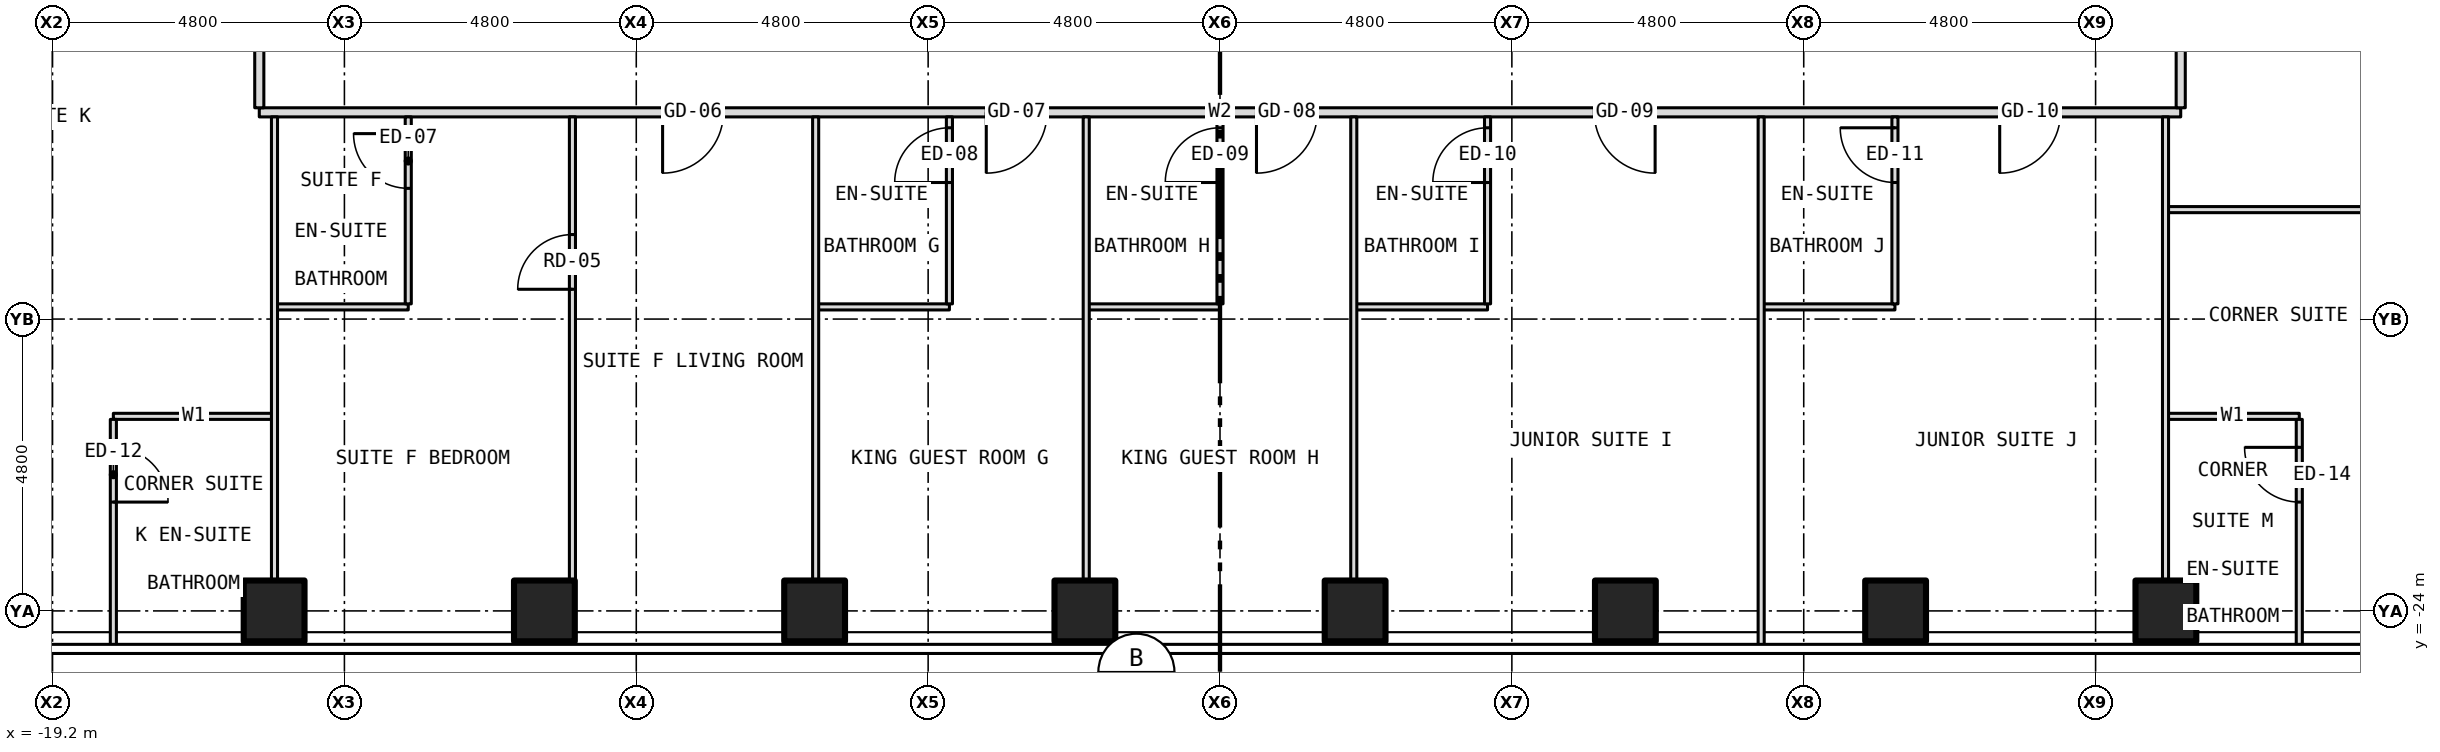
"""IFC4 building model, lengths in metres.
Left out: names, types, materials, properties, quantities, classifications, styles, units other than length and angle.
Written with IfcOpenShell. Run it as: python <this file> out.ifc"""

import sys

from ifc_helpers import new_model, si_unit, direction, frame, frame_2d, origin, origin_2d, place, context, subcontext, project, spatial, rectangle, hollow_rectangle, extrude, element, fill, save


model = new_model("IFC4")
c1 = context("Model", 3, precision=1e-05, world=origin(), true_north=direction((0.0, 1.0)))
c2 = subcontext(c1, "Body", "Model", "MODEL_VIEW")
j1 = project(units=[si_unit("LENGTHUNIT", "METRE"), si_unit("PLANEANGLEUNIT", "RADIAN")], contexts=[c1])
p1 = place(None, origin())
s1 = spatial("IfcSite", under=j1, at=p1, CompositionType="ELEMENT")
p2 = place(p1, origin())
s2 = spatial("IfcBuilding", under=s1, at=p2, CompositionType="ELEMENT")
p3 = place(p2, frame((0.0, 0.0, 39.0)))
s3 = spatial("IfcBuildingStorey", under=s2, at=p3, CompositionType="ELEMENT", Elevation=39.0)
for number, where, z_axis, x_axis in (
    (1, (-15.556, -24.0, -0.15), (0.0, 0.0, 1.0), (1.0, 0.0, 0.0)),
    (2, (-11.111, -24.0, -0.15), (0.0, 0.0, 1.0), (1.0, 0.0, 0.0)),
    (3, (-6.667, -24.0, -0.15), (0.0, 0.0, 1.0), (1.0, 0.0, 0.0)),
    (4, (-2.222, -24.0, -0.15), (0.0, 0.0, 1.0), (1.0, 0.0, 0.0)),
    (5, (2.222, -24.0, -0.15), (0.0, 0.0, 1.0), (1.0, 0.0, 0.0)),
    (6, (6.667, -24.0, -0.15), (0.0, 0.0, 1.0), (1.0, 0.0, 0.0)),
    (7, (11.111, -24.0, -0.15), (0.0, 0.0, 1.0), (1.0, 0.0, 0.0)),
    (8, (15.556, -24.0, -0.15), (0.0, 0.0, 1.0), (1.0, 0.0, 0.0)),
):
    element("IfcColumn", number, at=place(p3, frame(where, z_axis=z_axis, x_axis=x_axis)), inside=s3, PredefinedType="COLUMN", context=c2, shape_type="SweptSolid", body=[
        extrude(hollow_rectangle(XDim=1.0, YDim=1.0, WallThickness=0.06, at=origin_2d()), origin(), (0.0, 0.0, 1.0), 3.5),
    ])
p4 = place(p3, frame((-18.2, -20.8, 0.0), z_axis=(0.0, 0.0, 1.0), x_axis=(1.0, 0.0, 0.0)))
e9 = element("IfcWall", 9, at=p4, inside=s3, PredefinedType="PARTITIONING", context=c2, shape_type="SweptSolid", body=[
    extrude(rectangle(XDim=2.65, YDim=0.1, at=frame_2d((1.325, 0.0))), origin(), (0.0, 0.0, 1.0), 3.35),
])
for number, where, z_axis, x_axis in (
    (10, (15.55, -20.8, 0.0), (0.0, 0.0, 1.0), (1.0, 0.0, 0.0)),
    (11, (-15.55, -19.0, 0.0), (0.0, 0.0, 1.0), (1.0, 0.0, 0.0)),
    (12, (-6.65, -19.0, 0.0), (0.0, 0.0, 1.0), (1.0, 0.0, 0.0)),
    (13, (-2.2, -19.0, 0.0), (0.0, 0.0, 1.0), (1.0, 0.0, 0.0)),
    (14, (2.2, -19.0, 0.0), (0.0, 0.0, 1.0), (1.0, 0.0, 0.0)),
):
    element("IfcWall", number, at=place(p3, frame(where, z_axis=z_axis, x_axis=x_axis)), inside=s3, PredefinedType="PARTITIONING", context=c2, shape_type="SweptSolid", body=[
        extrude(rectangle(XDim=2.2, YDim=0.1, at=frame_2d((1.1, 0.0))), origin(), (0.0, 0.0, 1.0), 3.35),
    ])
p5 = place(p3, frame((8.9, -19.0, 0.0), z_axis=(0.0, 0.0, 1.0), x_axis=(1.0, 0.0, 0.0)))
e15 = element("IfcWall", 15, at=p5, inside=s3, PredefinedType="PARTITIONING", context=c2, shape_type="SweptSolid", body=[
    extrude(rectangle(XDim=2.2, YDim=0.1, at=frame_2d((1.1, 0.0))), origin(), (0.0, 0.0, 1.0), 3.35),
])
p6 = place(p3, frame((15.55, -17.4, 0.0), z_axis=(0.0, 0.0, 1.0), x_axis=(1.0, 0.0, 0.0)))
e16 = element("IfcWall", 16, at=p6, inside=s3, PredefinedType="PARTITIONING", context=c2, shape_type="SweptSolid", body=[
    extrude(rectangle(XDim=9.03, YDim=0.1, at=frame_2d((4.515, 0.0))), origin(), (0.0, 0.0, 1.0), 3.35),
])
p7 = place(p6, frame((3.778, 0.0, 0.0)))
e17 = element("IfcOpeningElement", 17, at=p7, cuts=e16, PredefinedType="OPENING", context=c2, shape_type="SweptSolid", body=[
    extrude(rectangle(XDim=0.9, YDim=2.1, at=frame_2d((0.45, 1.05))), frame((0.0, 0.062, 0.0), z_axis=(0.0, -1.0, 0.0), x_axis=(1.0, 0.0, 0.0)), (0.0, 0.0, 1.0), 0.124),
])
p8 = place(p3, frame((-15.8, -15.8, 0.0), z_axis=(0.0, 0.0, 1.0), x_axis=(1.0, 0.0, 0.0)))
e18 = element("IfcWall", 18, at=p8, inside=s3, PredefinedType="PARTITIONING", context=c2, shape_type="SweptSolid", body=[
    extrude(rectangle(XDim=31.6, YDim=0.15, at=frame_2d((15.8, 0.0))), origin(), (0.0, 0.0, 1.0), 3.35),
])
p9 = place(p8, frame((6.633, 0.0, 0.0)))
e19 = element("IfcOpeningElement", 19, at=p9, cuts=e18, PredefinedType="OPENING", context=c2, shape_type="SweptSolid", body=[
    extrude(rectangle(XDim=1.0, YDim=2.1, at=frame_2d((0.5, 1.05))), frame((0.0, 0.087, 0.0), z_axis=(0.0, -1.0, 0.0), x_axis=(1.0, 0.0, 0.0)), (0.0, 0.0, 1.0), 0.174),
])
p10 = place(p8, frame((11.956, 0.0, 0.0)))
e20 = element("IfcOpeningElement", 20, at=p10, cuts=e18, PredefinedType="OPENING", context=c2, shape_type="SweptSolid", body=[
    extrude(rectangle(XDim=1.0, YDim=2.1, at=frame_2d((0.5, 1.05))), frame((0.0, 0.087, 0.0), z_axis=(0.0, -1.0, 0.0), x_axis=(1.0, 0.0, 0.0)), (0.0, 0.0, 1.0), 0.174),
])
p11 = place(p8, frame((16.4, 0.0, 0.0)))
e21 = element("IfcOpeningElement", 21, at=p11, cuts=e18, PredefinedType="OPENING", context=c2, shape_type="SweptSolid", body=[
    extrude(rectangle(XDim=1.0, YDim=2.1, at=frame_2d((0.5, 1.05))), frame((0.0, 0.087, 0.0), z_axis=(0.0, -1.0, 0.0), x_axis=(1.0, 0.0, 0.0)), (0.0, 0.0, 1.0), 0.174),
])
p12 = place(p8, frame((21.956, 0.0, 0.0)))
e22 = element("IfcOpeningElement", 22, at=p12, cuts=e18, PredefinedType="OPENING", context=c2, shape_type="SweptSolid", body=[
    extrude(rectangle(XDim=1.0, YDim=2.1, at=frame_2d((0.5, 1.05))), frame((0.0, 0.087, 0.0), z_axis=(0.0, -1.0, 0.0), x_axis=(1.0, 0.0, 0.0)), (0.0, 0.0, 1.0), 0.174),
])
p13 = place(p8, frame((28.623, 0.0, 0.0)))
e23 = element("IfcOpeningElement", 23, at=p13, cuts=e18, PredefinedType="OPENING", context=c2, shape_type="SweptSolid", body=[
    extrude(rectangle(XDim=1.0, YDim=2.1, at=frame_2d((0.5, 1.05))), frame((0.0, 0.087, 0.0), z_axis=(0.0, -1.0, 0.0), x_axis=(1.0, 0.0, 0.0)), (0.0, 0.0, 1.0), 0.174),
])
p14 = place(p3, frame((-18.2, -24.58, 0.0), z_axis=(0.0, 0.0, 1.0), x_axis=(0.0, 1.0, 0.0)))
e24 = element("IfcWall", 24, at=p14, inside=s3, PredefinedType="PARTITIONING", context=c2, shape_type="SweptSolid", body=[
    extrude(rectangle(XDim=3.73, YDim=0.1, at=frame_2d((1.865, 0.0))), origin(), (0.0, 0.0, 1.0), 3.35),
])
p15 = place(p14, frame((2.37, 0.0, 0.0)))
e25 = element("IfcOpeningElement", 25, at=p15, cuts=e24, PredefinedType="OPENING", context=c2, shape_type="SweptSolid", body=[
    extrude(rectangle(XDim=0.9, YDim=2.1, at=frame_2d((0.45, 1.05))), frame((0.0, 0.062, 0.0), z_axis=(0.0, -1.0, 0.0), x_axis=(1.0, 0.0, 0.0)), (0.0, 0.0, 1.0), 0.124),
])
p16 = place(p3, frame((-15.8, -15.725, 0.0), z_axis=(0.0, 0.0, 1.0), x_axis=(0.0, 1.0, 0.0)))
e26 = element("IfcWall", 26, at=p16, inside=s3, PredefinedType="PARTITIONING", context=c2, shape_type="SweptSolid", body=[
    extrude(rectangle(XDim=4.805, YDim=0.15, at=frame_2d((2.403, 0.0))), origin(), (0.0, 0.0, 1.0), 3.35),
])
p17 = place(p16, frame((3.025, 0.0, 0.0)))
e27 = element("IfcOpeningElement", 27, at=p17, cuts=e26, PredefinedType="OPENING", context=c2, shape_type="SweptSolid", body=[
    extrude(rectangle(XDim=1.0, YDim=2.1, at=frame_2d((0.5, 1.05))), frame((0.0, 0.087, 0.0), z_axis=(0.0, -1.0, 0.0), x_axis=(1.0, 0.0, 0.0)), (0.0, 0.0, 1.0), 0.174),
])
p18 = place(p3, frame((-15.55, -23.88, 0.0), z_axis=(0.0, 0.0, 1.0), x_axis=(0.0, 1.0, 0.0)))
e28 = element("IfcWall", 28, at=p18, inside=s3, PredefinedType="PARTITIONING", context=c2, shape_type="SweptSolid", body=[
    extrude(rectangle(XDim=8.005, YDim=0.1, at=frame_2d((4.002, 0.0))), origin(), (0.0, 0.0, 1.0), 3.35),
])
p19 = place(p3, frame((-13.35, -18.95, 0.0), z_axis=(0.0, 0.0, 1.0), x_axis=(0.0, 1.0, 0.0)))
e29 = element("IfcWall", 29, at=p19, inside=s3, PredefinedType="PARTITIONING", context=c2, shape_type="SweptSolid", body=[
    extrude(rectangle(XDim=3.075, YDim=0.1, at=frame_2d((1.538, 0.0))), origin(), (0.0, 0.0, 1.0), 3.35),
])
p20 = place(p19, frame((1.9, 0.0, 0.0)))
e30 = element("IfcOpeningElement", 30, at=p20, cuts=e29, PredefinedType="OPENING", context=c2, shape_type="SweptSolid", body=[
    extrude(rectangle(XDim=0.9, YDim=2.1, at=frame_2d((0.45, 1.05))), frame((0.0, 0.062, 0.0), z_axis=(0.0, -1.0, 0.0), x_axis=(1.0, 0.0, 0.0)), (0.0, 0.0, 1.0), 0.124),
])
p21 = place(p3, frame((-10.65, -23.88, 0.0), z_axis=(0.0, 0.0, 1.0), x_axis=(0.0, 1.0, 0.0)))
e31 = element("IfcWall", 31, at=p21, inside=s3, PredefinedType="PARTITIONING", context=c2, shape_type="SweptSolid", body=[
    extrude(rectangle(XDim=8.005, YDim=0.1, at=frame_2d((4.002, 0.0))), origin(), (0.0, 0.0, 1.0), 3.35),
])
p22 = place(p21, frame((5.17, 0.0, 0.0)))
e32 = element("IfcOpeningElement", 32, at=p22, cuts=e31, PredefinedType="OPENING", context=c2, shape_type="SweptSolid", body=[
    extrude(rectangle(XDim=0.9, YDim=2.1, at=frame_2d((0.45, 1.05))), frame((0.0, 0.062, 0.0), z_axis=(0.0, -1.0, 0.0), x_axis=(1.0, 0.0, 0.0)), (0.0, 0.0, 1.0), 0.124),
])
p23 = place(p3, frame((-6.65, -23.88, 0.0), z_axis=(0.0, 0.0, 1.0), x_axis=(0.0, 1.0, 0.0)))
e33 = element("IfcWall", 33, at=p23, inside=s3, PredefinedType="PARTITIONING", context=c2, shape_type="SweptSolid", body=[
    extrude(rectangle(XDim=8.005, YDim=0.1, at=frame_2d((4.002, 0.0))), origin(), (0.0, 0.0, 1.0), 3.35),
])
p24 = place(p3, frame((-4.45, -18.95, 0.0), z_axis=(0.0, 0.0, 1.0), x_axis=(0.0, 1.0, 0.0)))
e34 = element("IfcWall", 34, at=p24, inside=s3, PredefinedType="PARTITIONING", context=c2, shape_type="SweptSolid", body=[
    extrude(rectangle(XDim=3.075, YDim=0.1, at=frame_2d((1.538, 0.0))), origin(), (0.0, 0.0, 1.0), 3.35),
])
p25 = place(p24, frame((1.996, 0.0, 0.0)))
e35 = element("IfcOpeningElement", 35, at=p25, cuts=e34, PredefinedType="OPENING", context=c2, shape_type="SweptSolid", body=[
    extrude(rectangle(XDim=0.9, YDim=2.1, at=frame_2d((0.45, 1.05))), frame((0.0, 0.062, 0.0), z_axis=(0.0, -1.0, 0.0), x_axis=(1.0, 0.0, 0.0)), (0.0, 0.0, 1.0), 0.124),
])
p26 = place(p3, frame((-2.2, -23.88, 0.0), z_axis=(0.0, 0.0, 1.0), x_axis=(0.0, 1.0, 0.0)))
e36 = element("IfcWall", 36, at=p26, inside=s3, PredefinedType="PARTITIONING", context=c2, shape_type="SweptSolid", body=[
    extrude(rectangle(XDim=8.005, YDim=0.1, at=frame_2d((4.002, 0.0))), origin(), (0.0, 0.0, 1.0), 3.35),
])
p27 = place(p3, frame((0.0, -18.95, 0.0), z_axis=(0.0, 0.0, 1.0), x_axis=(0.0, 1.0, 0.0)))
e37 = element("IfcWall", 37, at=p27, inside=s3, PredefinedType="PARTITIONING", context=c2, shape_type="SweptSolid", body=[
    extrude(rectangle(XDim=3.075, YDim=0.1, at=frame_2d((1.538, 0.0))), origin(), (0.0, 0.0, 1.0), 2.728),
])
p28 = place(p27, frame((1.996, 0.0, 0.0)))
e38 = element("IfcOpeningElement", 38, at=p28, cuts=e37, PredefinedType="OPENING", context=c2, shape_type="SweptSolid", body=[
    extrude(rectangle(XDim=0.9, YDim=2.1, at=frame_2d((0.45, 1.05))), frame((0.0, 0.062, 0.0), z_axis=(0.0, -1.0, 0.0), x_axis=(1.0, 0.0, 0.0)), (0.0, 0.0, 1.0), 0.124),
])
p29 = place(p3, frame((2.2, -23.88, 0.0), z_axis=(0.0, 0.0, 1.0), x_axis=(0.0, 1.0, 0.0)))
e39 = element("IfcWall", 39, at=p29, inside=s3, PredefinedType="PARTITIONING", context=c2, shape_type="SweptSolid", body=[
    extrude(rectangle(XDim=8.005, YDim=0.1, at=frame_2d((4.002, 0.0))), origin(), (0.0, 0.0, 1.0), 3.35),
])
p30 = place(p3, frame((4.4, -18.95, 0.0), z_axis=(0.0, 0.0, 1.0), x_axis=(0.0, 1.0, 0.0)))
e40 = element("IfcWall", 40, at=p30, inside=s3, PredefinedType="PARTITIONING", context=c2, shape_type="SweptSolid", body=[
    extrude(rectangle(XDim=3.075, YDim=0.1, at=frame_2d((1.538, 0.0))), origin(), (0.0, 0.0, 1.0), 3.35),
])
p31 = place(p30, frame((1.996, 0.0, 0.0)))
e41 = element("IfcOpeningElement", 41, at=p31, cuts=e40, PredefinedType="OPENING", context=c2, shape_type="SweptSolid", body=[
    extrude(rectangle(XDim=0.9, YDim=2.1, at=frame_2d((0.45, 1.05))), frame((0.0, 0.062, 0.0), z_axis=(0.0, -1.0, 0.0), x_axis=(1.0, 0.0, 0.0)), (0.0, 0.0, 1.0), 0.124),
])
p32 = place(p3, frame((8.9, -24.58, 0.0), z_axis=(0.0, 0.0, 1.0), x_axis=(0.0, 1.0, 0.0)))
e42 = element("IfcWall", 42, at=p32, inside=s3, PredefinedType="PARTITIONING", context=c2, shape_type="SweptSolid", body=[
    extrude(rectangle(XDim=8.705, YDim=0.1, at=frame_2d((4.353, 0.0))), origin(), (0.0, 0.0, 1.0), 3.35),
])
p33 = place(p3, frame((11.1, -18.95, 0.0), z_axis=(0.0, 0.0, 1.0), x_axis=(0.0, 1.0, 0.0)))
e43 = element("IfcWall", 43, at=p33, inside=s3, PredefinedType="PARTITIONING", context=c2, shape_type="SweptSolid", body=[
    extrude(rectangle(XDim=3.075, YDim=0.1, at=frame_2d((1.538, 0.0))), origin(), (0.0, 0.0, 1.0), 3.35),
])
p34 = place(p33, frame((1.996, 0.0, 0.0)))
e44 = element("IfcOpeningElement", 44, at=p34, cuts=e43, PredefinedType="OPENING", context=c2, shape_type="SweptSolid", body=[
    extrude(rectangle(XDim=0.9, YDim=2.1, at=frame_2d((0.45, 1.05))), frame((0.0, 0.062, 0.0), z_axis=(0.0, -1.0, 0.0), x_axis=(1.0, 0.0, 0.0)), (0.0, 0.0, 1.0), 0.124),
])
p35 = place(p3, frame((15.55, -23.88, 0.0), z_axis=(0.0, 0.0, 1.0), x_axis=(0.0, 1.0, 0.0)))
e45 = element("IfcWall", 45, at=p35, inside=s3, PredefinedType="PARTITIONING", context=c2, shape_type="SweptSolid", body=[
    extrude(rectangle(XDim=8.005, YDim=0.1, at=frame_2d((4.002, 0.0))), origin(), (0.0, 0.0, 1.0), 3.35),
])
p36 = place(p3, frame((15.8, -15.725, 0.0), z_axis=(0.0, 0.0, 1.0), x_axis=(0.0, 1.0, 0.0)))
e46 = element("IfcWall", 46, at=p36, inside=s3, PredefinedType="PARTITIONING", context=c2, shape_type="SweptSolid", body=[
    extrude(rectangle(XDim=4.805, YDim=0.15, at=frame_2d((2.403, 0.0))), origin(), (0.0, 0.0, 1.0), 3.35),
])
p37 = place(p36, frame((3.025, 0.0, 0.0)))
e47 = element("IfcOpeningElement", 47, at=p37, cuts=e46, PredefinedType="OPENING", context=c2, shape_type="SweptSolid", body=[
    extrude(rectangle(XDim=1.0, YDim=2.1, at=frame_2d((0.5, 1.05))), frame((0.0, 0.087, 0.0), z_axis=(0.0, -1.0, 0.0), x_axis=(1.0, 0.0, 0.0)), (0.0, 0.0, 1.0), 0.174),
])
p38 = place(p3, frame((17.75, -24.58, 0.0), z_axis=(0.0, 0.0, 1.0), x_axis=(0.0, 1.0, 0.0)))
e48 = element("IfcWall", 48, at=p38, inside=s3, PredefinedType="PARTITIONING", context=c2, shape_type="SweptSolid", body=[
    extrude(rectangle(XDim=3.73, YDim=0.1, at=frame_2d((1.865, 0.0))), origin(), (0.0, 0.0, 1.0), 3.35),
])
p39 = place(p38, frame((2.37, 0.0, 0.0)))
e49 = element("IfcOpeningElement", 49, at=p39, cuts=e48, PredefinedType="OPENING", context=c2, shape_type="SweptSolid", body=[
    extrude(rectangle(XDim=0.9, YDim=2.1, at=frame_2d((0.45, 1.05))), frame((0.0, 0.062, 0.0), z_axis=(0.0, -1.0, 0.0), x_axis=(1.0, 0.0, 0.0)), (0.0, 0.0, 1.0), 0.124),
])
p40 = place(p9, origin())
e50 = element("IfcDoor", 50, at=p40, inside=s3, OperationType="SINGLE_SWING_LEFT", PredefinedType="DOOR", context=c2, shape_type="SweptSolid", body=[
    extrude(rectangle(XDim=1.0, YDim=2.1, at=frame_2d((0.5, 1.05))), frame((0.0, 0.025, 0.0), z_axis=(0.0, -1.0, 0.0), x_axis=(1.0, 0.0, 0.0)), (0.0, 0.0, 1.0), 0.05),
])
fill(e19, e50)
p41 = place(p22, origin())
e51 = element("IfcDoor", 51, at=p41, inside=s3, OperationType="SINGLE_SWING_LEFT", PredefinedType="DOOR", context=c2, shape_type="SweptSolid", body=[
    extrude(rectangle(XDim=0.9, YDim=2.1, at=frame_2d((0.45, 1.05))), frame((0.0, 0.025, 0.0), z_axis=(0.0, -1.0, 0.0), x_axis=(1.0, 0.0, 0.0)), (0.0, 0.0, 1.0), 0.05),
])
fill(e32, e51)
p42 = place(p20, origin())
e52 = element("IfcDoor", 52, at=p42, inside=s3, OperationType="SINGLE_SWING_RIGHT", PredefinedType="DOOR", context=c2, shape_type="SweptSolid", body=[
    extrude(rectangle(XDim=0.9, YDim=2.1, at=frame_2d((0.45, 1.05))), frame((0.0, 0.025, 0.0), z_axis=(0.0, -1.0, 0.0), x_axis=(1.0, 0.0, 0.0)), (0.0, 0.0, 1.0), 0.05),
])
fill(e30, e52)
p43 = place(p10, origin())
e53 = element("IfcDoor", 53, at=p43, inside=s3, OperationType="SINGLE_SWING_LEFT", PredefinedType="DOOR", context=c2, shape_type="SweptSolid", body=[
    extrude(rectangle(XDim=1.0, YDim=2.1, at=frame_2d((0.5, 1.05))), frame((0.0, 0.025, 0.0), z_axis=(0.0, -1.0, 0.0), x_axis=(1.0, 0.0, 0.0)), (0.0, 0.0, 1.0), 0.05),
])
fill(e20, e53)
p44 = place(p25, origin())
e54 = element("IfcDoor", 54, at=p44, inside=s3, OperationType="SINGLE_SWING_LEFT", PredefinedType="DOOR", context=c2, shape_type="SweptSolid", body=[
    extrude(rectangle(XDim=0.9, YDim=2.1, at=frame_2d((0.45, 1.05))), frame((0.0, 0.025, 0.0), z_axis=(0.0, -1.0, 0.0), x_axis=(1.0, 0.0, 0.0)), (0.0, 0.0, 1.0), 0.05),
])
fill(e35, e54)
p45 = place(p11, origin())
e55 = element("IfcDoor", 55, at=p45, inside=s3, OperationType="SINGLE_SWING_LEFT", PredefinedType="DOOR", context=c2, shape_type="SweptSolid", body=[
    extrude(rectangle(XDim=1.0, YDim=2.1, at=frame_2d((0.5, 1.05))), frame((0.0, 0.025, 0.0), z_axis=(0.0, -1.0, 0.0), x_axis=(1.0, 0.0, 0.0)), (0.0, 0.0, 1.0), 0.05),
])
fill(e21, e55)
p46 = place(p28, origin())
e56 = element("IfcDoor", 56, at=p46, inside=s3, OperationType="SINGLE_SWING_LEFT", PredefinedType="DOOR", context=c2, shape_type="SweptSolid", body=[
    extrude(rectangle(XDim=0.9, YDim=2.1, at=frame_2d((0.45, 1.05))), frame((0.0, 0.025, 0.0), z_axis=(0.0, -1.0, 0.0), x_axis=(1.0, 0.0, 0.0)), (0.0, 0.0, 1.0), 0.05),
])
fill(e38, e56)
p47 = place(p12, origin())
e57 = element("IfcDoor", 57, at=p47, inside=s3, OperationType="SINGLE_SWING_RIGHT", PredefinedType="DOOR", context=c2, shape_type="SweptSolid", body=[
    extrude(rectangle(XDim=1.0, YDim=2.1, at=frame_2d((0.5, 1.05))), frame((0.0, 0.025, 0.0), z_axis=(0.0, -1.0, 0.0), x_axis=(1.0, 0.0, 0.0)), (0.0, 0.0, 1.0), 0.05),
])
fill(e22, e57)
p48 = place(p31, origin())
e58 = element("IfcDoor", 58, at=p48, inside=s3, OperationType="SINGLE_SWING_LEFT", PredefinedType="DOOR", context=c2, shape_type="SweptSolid", body=[
    extrude(rectangle(XDim=0.9, YDim=2.1, at=frame_2d((0.45, 1.05))), frame((0.0, 0.025, 0.0), z_axis=(0.0, -1.0, 0.0), x_axis=(1.0, 0.0, 0.0)), (0.0, 0.0, 1.0), 0.05),
])
fill(e41, e58)
p49 = place(p13, origin())
e59 = element("IfcDoor", 59, at=p49, inside=s3, OperationType="SINGLE_SWING_LEFT", PredefinedType="DOOR", context=c2, shape_type="SweptSolid", body=[
    extrude(rectangle(XDim=1.0, YDim=2.1, at=frame_2d((0.5, 1.05))), frame((0.0, 0.025, 0.0), z_axis=(0.0, -1.0, 0.0), x_axis=(1.0, 0.0, 0.0)), (0.0, 0.0, 1.0), 0.05),
])
fill(e23, e59)
p50 = place(p34, origin())
e60 = element("IfcDoor", 60, at=p50, inside=s3, OperationType="SINGLE_SWING_RIGHT", PredefinedType="DOOR", context=c2, shape_type="SweptSolid", body=[
    extrude(rectangle(XDim=0.9, YDim=2.1, at=frame_2d((0.45, 1.05))), frame((0.0, 0.025, 0.0), z_axis=(0.0, -1.0, 0.0), x_axis=(1.0, 0.0, 0.0)), (0.0, 0.0, 1.0), 0.05),
])
fill(e44, e60)
p51 = place(p15, origin())
e61 = element("IfcDoor", 61, at=p51, inside=s3, OperationType="SINGLE_SWING_LEFT", PredefinedType="DOOR", context=c2, shape_type="SweptSolid", body=[
    extrude(rectangle(XDim=0.9, YDim=2.1, at=frame_2d((0.45, 1.05))), frame((0.0, 0.025, 0.0), z_axis=(0.0, -1.0, 0.0), x_axis=(1.0, 0.0, 0.0)), (0.0, 0.0, 1.0), 0.05),
])
fill(e25, e61)
p52 = place(p39, origin())
e62 = element("IfcDoor", 62, at=p52, inside=s3, OperationType="SINGLE_SWING_RIGHT", PredefinedType="DOOR", context=c2, shape_type="SweptSolid", body=[
    extrude(rectangle(XDim=0.9, YDim=2.1, at=frame_2d((0.45, 1.05))), frame((0.0, 0.025, 0.0), z_axis=(0.0, -1.0, 0.0), x_axis=(1.0, 0.0, 0.0)), (0.0, 0.0, 1.0), 0.05),
])
fill(e49, e62)
save(model, sys.argv[1])
